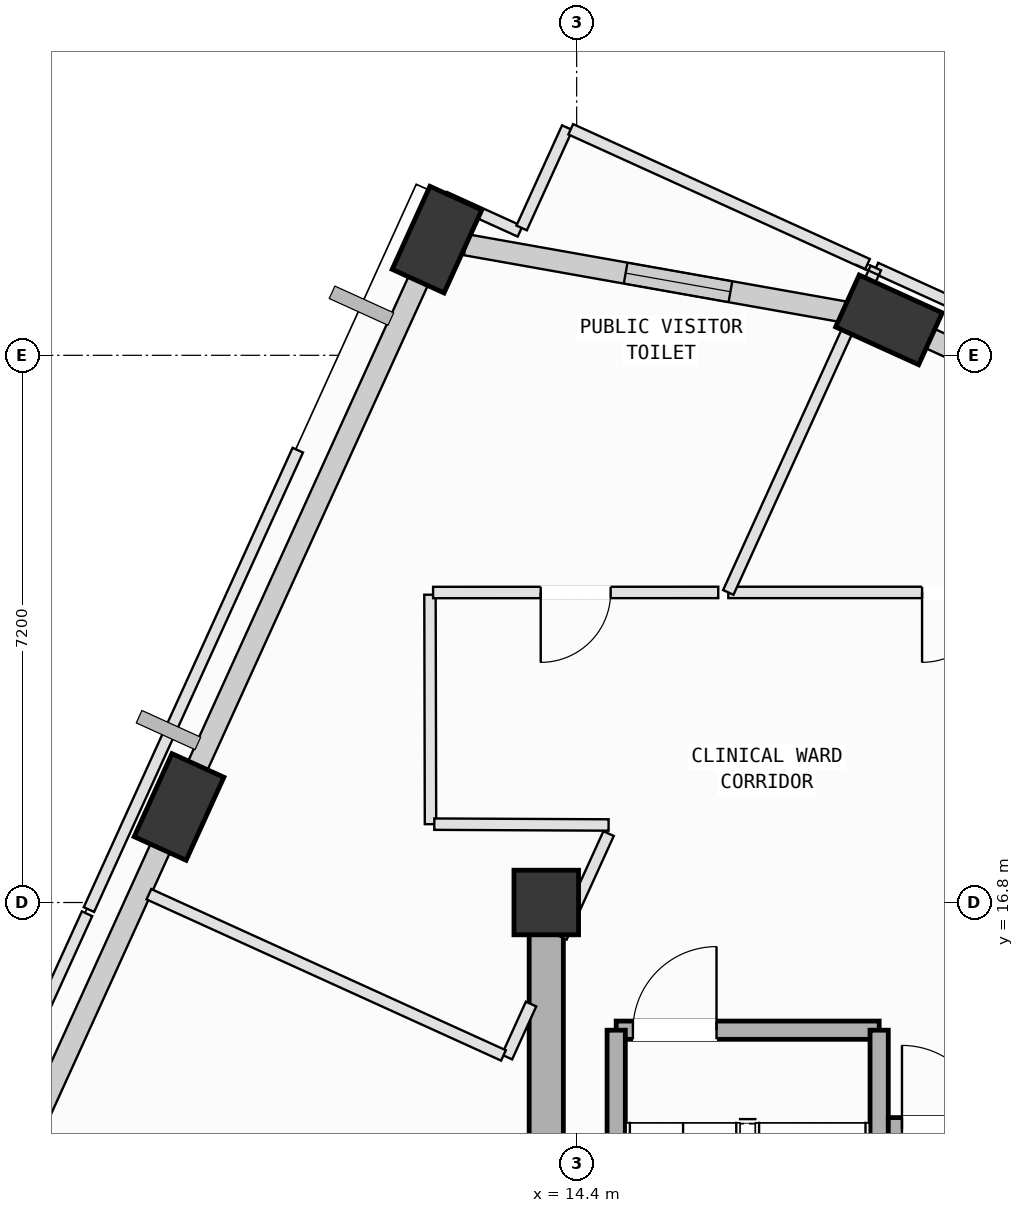
"""IFC4 building model, lengths in metres.
Left out: names, types, materials, properties, quantities, classifications, styles, units other than length and angle.
Written with IfcOpenShell. Run it as: python <this file> out.ifc"""

import sys

from ifc_helpers import new_model, si_unit, direction, frame, frame_2d, origin, origin_2d, place, context, subcontext, project, spatial, rectangle, extrude, element, fill, save


model = new_model("IFC4")
c1 = context("Model", 3, precision=1e-05, world=origin(), true_north=direction((0.0, 1.0)))
c2 = subcontext(c1, "Body", "Model", "MODEL_VIEW")
j1 = project(units=[si_unit("LENGTHUNIT", "METRE"), si_unit("PLANEANGLEUNIT", "RADIAN")], contexts=[c1])
p1 = place(None, origin())
s1 = spatial("IfcSite", under=j1, at=p1, CompositionType="ELEMENT")
p2 = place(p1, origin())
s2 = spatial("IfcBuilding", under=s1, at=p2, CompositionType="ELEMENT")
p3 = place(p2, frame((0.0, 0.0, 304.6)))
s3 = spatial("IfcBuildingStorey", under=s2, at=p3, CompositionType="ELEMENT", Elevation=304.6)
p4 = place(p3, frame((14.0, 16.8, 0.0), z_axis=(0.0, 0.0, 1.0), x_axis=(1.0, 0.0, 0.0)))
e1 = element("IfcColumn", 1, at=p4, inside=s3, PredefinedType="COLUMN", context=c2, shape_type="SweptSolid", body=[
    extrude(rectangle(XDim=0.85, YDim=0.85, at=origin_2d()), origin(), (0.0, 0.0, 1.0), 4.0),
])
p5 = place(p3, frame((18.509, 24.466, 0.002), z_axis=(0.001907962149, -0.062408826429, 0.99804884553), x_axis=(-0.92252082505, 0.385081115761, 0.025843019053)))
e2 = element("IfcColumn", 2, at=p5, inside=s3, PredefinedType="COLUMN", context=c2, shape_type="SweptSolid", body=[
    extrude(rectangle(XDim=1.2, YDim=0.75, at=origin_2d()), origin(), (0.0, 0.0, 1.0), 3.967),
])
p6 = place(p3, frame((12.562, 25.522, 0.002), z_axis=(-0.002225221518, -0.086845450907, 0.996219311219), x_axis=(0.436992381583, 0.895981854379, 0.079083342504)))
e3 = element("IfcColumn", 3, at=p6, inside=s3, PredefinedType="COLUMN", context=c2, shape_type="SweptSolid", body=[
    extrude(rectangle(XDim=1.2, YDim=0.75, at=origin_2d()), origin(), (0.0, 0.0, 1.0), 3.95),
])
p7 = place(p3, frame((9.168, 18.057, 0.002), z_axis=(0.028599058386, -0.100468120695, 0.994529160248), x_axis=(0.150218370029, 0.984069108153, 0.095091701455)))
e4 = element("IfcColumn", 4, at=p7, inside=s3, PredefinedType="COLUMN", context=c2, shape_type="SweptSolid", body=[
    extrude(rectangle(XDim=1.2, YDim=0.75, at=origin_2d()), origin(), (0.0, 0.0, 1.0), 3.944),
])
p8 = place(p3, frame((18.906, 24.286, 0.0), z_axis=(0.0, 0.0, 1.0), x_axis=(0.910319616875, -0.413906022101, 0.0)))
e5 = element("IfcWall", 5, at=p8, inside=s3, PredefinedType="SOLIDWALL", context=c2, shape_type="SweptSolid", body=[
    extrude(rectangle(XDim=6.424, YDim=0.28, at=frame_2d((3.212, 0.0))), origin(), (0.0, 0.0, 1.0), 3.265),
])
p9 = place(p8, frame((1.201, 0.0, 0.75)))
e6 = element("IfcOpeningElement", 6, at=p9, cuts=e5, PredefinedType="OPENING", context=c2, shape_type="SweptSolid", body=[
    extrude(rectangle(XDim=2.0, YDim=1.95, at=frame_2d((1.0, 0.975))), frame((0.0, 0.15, 0.0), z_axis=(0.0, -1.0, 0.0), x_axis=(1.0, 0.0, 0.0)), (0.0, 0.0, 1.0), 0.3),
])
p10 = place(p3, frame((12.941, 25.455, 0.0), z_axis=(0.0, 0.0, 1.0), x_axis=(0.984598986334, -0.174828018664, 0.0)))
e7 = element("IfcWall", 7, at=p10, inside=s3, PredefinedType="SOLIDWALL", context=c2, shape_type="SweptSolid", body=[
    extrude(rectangle(XDim=5.302, YDim=0.28, at=frame_2d((2.651, 0.0))), origin(), (0.0, 0.0, 1.0), 3.265),
])
p11 = place(p10, frame((2.137, 0.0, 0.75)))
e8 = element("IfcOpeningElement", 8, at=p11, cuts=e7, PredefinedType="OPENING", context=c2, shape_type="SweptSolid", body=[
    extrude(rectangle(XDim=1.4, YDim=1.85, at=frame_2d((0.7, 0.925))), frame((0.0, 0.15, 0.0), z_axis=(0.0, -1.0, 0.0), x_axis=(1.0, 0.0, 0.0)), (0.0, 0.0, 1.0), 0.3),
])
p12 = place(p3, frame((9.257, 18.252, 0.0), z_axis=(0.0, 0.0, 1.0), x_axis=(0.413924181298, 0.910311359996, 0.0)))
e9 = element("IfcWall", 9, at=p12, inside=s3, PredefinedType="SOLIDWALL", context=c2, shape_type="SweptSolid", body=[
    extrude(rectangle(XDim=7.434, YDim=0.28, at=frame_2d((3.717, 0.0))), origin(), (0.0, 0.0, 1.0), 3.265),
])
p13 = place(p3, frame((5.85, 10.758, 0.0), z_axis=(0.0, 0.0, 1.0), x_axis=(0.41389878739, 0.910322906334, 0.0)))
e10 = element("IfcWall", 10, at=p13, inside=s3, PredefinedType="SOLIDWALL", context=c2, shape_type="SweptSolid", body=[
    extrude(rectangle(XDim=7.485, YDim=0.28, at=frame_2d((3.742, 0.0))), origin(), (0.0, 0.0, 1.0), 3.265),
])
p14 = place(p3, frame((14.92, 15.12, 0.0), z_axis=(0.0, 0.0, 1.0), x_axis=(1.0, 0.0, 0.0)))
e11 = element("IfcWall", 11, at=p14, inside=s3, PredefinedType="SOLIDWALL", context=c2, shape_type="SweptSolid", body=[
    extrude(rectangle(XDim=3.46, YDim=0.24, at=frame_2d((1.73, 0.0))), origin(), (0.0, 0.0, 1.0), 3.78),
])
p15 = place(p14, frame((0.22, 0.0, 0.0)))
e12 = element("IfcOpeningElement", 12, at=p15, cuts=e11, PredefinedType="OPENING", context=c2, shape_type="SweptSolid", body=[
    extrude(rectangle(XDim=1.1, YDim=2.15, at=frame_2d((0.55, 1.075))), frame((0.0, 0.13, 0.0), z_axis=(0.0, -1.0, 0.0), x_axis=(1.0, 0.0, 0.0)), (0.0, 0.0, 1.0), 0.26),
])
for number, where, z_axis, x_axis in (
    (13, (18.38, 15.12, 0.0), (0.0, 0.0, 1.0), (0.0, -1.0, 0.0)),
    (14, (14.92, 8.025, 0.0), (0.0, 0.0, 1.0), (0.0, 1.0, 0.0)),
):
    element("IfcWall", number, at=place(p3, frame(where, z_axis=z_axis, x_axis=x_axis)), inside=s3, PredefinedType="SOLIDWALL", context=c2, shape_type="SweptSolid", body=[
        extrude(rectangle(XDim=7.095, YDim=0.24, at=frame_2d((3.548, 0.0))), origin(), (0.0, 0.0, 1.0), 3.78),
    ])
p16 = place(p3, frame((14.0, 16.8, 0.0), z_axis=(0.0, 0.0, 1.0), x_axis=(0.0, -1.0, 0.0)))
e15 = element("IfcWall", 15, at=p16, inside=s3, PredefinedType="SHEAR", context=c2, shape_type="SweptSolid", body=[
    extrude(rectangle(XDim=9.0, YDim=0.45, at=frame_2d((4.5, 0.0))), origin(), (0.0, 0.0, 1.0), 3.78),
])
p17 = place(p3, frame((18.5, 13.82, 0.0), z_axis=(0.0, 0.0, 1.0), x_axis=(1.0, 0.0, 0.0)))
e16 = element("IfcWall", 16, at=p17, inside=s3, PredefinedType="SOLIDWALL", context=c2, shape_type="SweptSolid", body=[
    extrude(rectangle(XDim=5.3, YDim=0.3, at=frame_2d((2.65, 0.0))), origin(), (0.0, 0.0, 1.0), 3.78),
])
p18 = place(p17, frame((0.18, 0.0, 0.0)))
e17 = element("IfcOpeningElement", 17, at=p18, cuts=e16, PredefinedType="OPENING", context=c2, shape_type="SweptSolid", body=[
    extrude(rectangle(XDim=1.1, YDim=2.15, at=frame_2d((0.55, 1.075))), frame((0.0, 0.16, 0.0), z_axis=(0.0, -1.0, 0.0), x_axis=(1.0, 0.0, 0.0)), (0.0, 0.0, 1.0), 0.32),
])
p19 = place(p3, frame((18.336, 25.149, 0.0), z_axis=(0.0, 0.0, 1.0), x_axis=(0.910329852278, -0.413883510245, 0.0)))
e18 = element("IfcWall", 18, at=p19, inside=s3, PredefinedType="PARTITIONING", context=c2, shape_type="SweptSolid", body=[
    extrude(rectangle(XDim=5.479, YDim=0.15, at=frame_2d((2.74, 0.0))), origin(), (0.0, 0.0, 1.0), 3.78),
])
p20 = place(p3, frame((22.414, 20.88, 0.0), z_axis=(0.0, 0.0, 1.0), x_axis=(-1.0, 0.0, 0.0)))
e19 = element("IfcWall", 19, at=p20, inside=s3, PredefinedType="PARTITIONING", context=c2, shape_type="SweptSolid", body=[
    extrude(rectangle(XDim=6.019, YDim=0.15, at=frame_2d((3.01, 0.0))), origin(), (0.0, 0.0, 1.0), 3.415),
])
p21 = place(p20, frame((2.55, 0.0, 0.0)))
e20 = element("IfcOpeningElement", 20, at=p21, cuts=e19, PredefinedType="OPENING", context=c2, shape_type="SweptSolid", body=[
    extrude(rectangle(XDim=0.92, YDim=2.1, at=frame_2d((0.46, 1.05))), frame((0.0, 0.085, 0.0), z_axis=(0.0, -1.0, 0.0), x_axis=(1.0, 0.0, 0.0)), (0.0, 0.0, 1.0), 0.17),
])
p22 = place(p3, frame((16.395, 20.88, 0.0), z_axis=(0.0, 0.0, 1.0), x_axis=(0.413930001639, 0.910308713428, 0.0)))
e21 = element("IfcWall", 21, at=p22, inside=s3, PredefinedType="PARTITIONING", context=c2, shape_type="SweptSolid", body=[
    extrude(rectangle(XDim=3.909, YDim=0.15, at=frame_2d((1.954, 0.0))), origin(), (0.0, 0.0, 1.0), 2.765),
])
p23 = place(p3, frame((18.111, 24.654, 0.0), z_axis=(0.0, 0.0, 1.0), x_axis=(0.413667579313, 0.91042799486, 0.0)))
e22 = element("IfcWall", 22, at=p23, inside=s3, PredefinedType="PARTITIONING", context=c2, shape_type="SweptSolid", body=[
    extrude(rectangle(XDim=0.543, YDim=0.15, at=frame_2d((0.272, 0.0))), origin(), (0.0, 0.0, 1.0), 3.78),
])
p24 = place(p3, frame((12.47, 20.85, 0.0), z_axis=(0.0, 0.0, 1.0), x_axis=(0.002345133451, -0.999997250171, 0.0)))
e23 = element("IfcWall", 23, at=p24, inside=s3, PredefinedType="PARTITIONING", context=c2, shape_type="SweptSolid", body=[
    extrude(rectangle(XDim=3.019, YDim=0.15, at=frame_2d((1.51, 0.0))), origin(), (0.0, 0.0, 1.0), 3.78),
])
p25 = place(p3, frame((12.527, 17.831, 0.0), z_axis=(0.0, 0.0, 1.0), x_axis=(0.999988521863, -0.004791256759, 0.0)))
e24 = element("IfcWall", 24, at=p25, inside=s3, PredefinedType="PARTITIONING", context=c2, shape_type="SweptSolid", body=[
    extrude(rectangle(XDim=2.293, YDim=0.15, at=frame_2d((1.146, 0.0))), origin(), (0.0, 0.0, 1.0), 3.78),
])
p26 = place(p3, frame((14.82, 17.707, 0.0), z_axis=(0.0, 0.0, 1.0), x_axis=(-0.414110008053, -0.910226840535, 0.0)))
e25 = element("IfcWall", 25, at=p26, inside=s3, PredefinedType="PARTITIONING", context=c2, shape_type="SweptSolid", body=[
    extrude(rectangle(XDim=1.498, YDim=0.15, at=frame_2d((0.749, 0.0))), origin(), (0.0, 0.0, 1.0), 2.765),
])
p27 = place(p3, frame((13.8, 15.464, 0.0), z_axis=(0.0, 0.0, 1.0), x_axis=(-0.414139199178, -0.910213559394, 0.0)))
e26 = element("IfcWall", 26, at=p27, inside=s3, PredefinedType="PARTITIONING", context=c2, shape_type="SweptSolid", body=[
    extrude(rectangle(XDim=0.766, YDim=0.15, at=frame_2d((0.383, 0.0))), origin(), (0.0, 0.0, 1.0), 3.78),
])
p28 = place(p3, frame((13.437, 14.788, 0.0), z_axis=(0.0, 0.0, 1.0), x_axis=(-0.910338738777, 0.413863963981, 0.0)))
e27 = element("IfcWall", 27, at=p28, inside=s3, PredefinedType="PARTITIONING", context=c2, shape_type="SweptSolid", body=[
    extrude(rectangle(XDim=5.125, YDim=0.15, at=frame_2d((2.562, 0.0))), origin(), (0.0, 0.0, 1.0), 3.78),
])
p29 = place(p3, frame((8.775, 17.65, 0.0), z_axis=(0.0, 0.0, 1.0), x_axis=(0.413704460003, 0.910411236625, 0.0)))
e28 = element("IfcWall", 28, at=p29, inside=s3, PredefinedType="PARTITIONING", context=c2, shape_type="SweptSolid", body=[
    extrude(rectangle(XDim=0.747, YDim=0.15, at=frame_2d((0.374, 0.0))), origin(), (0.0, 0.0, 1.0), 3.78),
])
p30 = place(p3, frame((12.161, 25.098, 0.0), z_axis=(0.0, 0.0, 1.0), x_axis=(0.413519388527, 0.910495313174, 0.0)))
e29 = element("IfcWall", 29, at=p30, inside=s3, PredefinedType="PARTITIONING", context=c2, shape_type="SweptSolid", body=[
    extrude(rectangle(XDim=1.103, YDim=0.15, at=frame_2d((0.551, 0.0))), origin(), (0.0, 0.0, 1.0), 3.265),
])
p31 = place(p3, frame((12.663, 26.081, 0.0), z_axis=(0.0, 0.0, 1.0), x_axis=(0.910266708037, -0.414022366835, 0.0)))
e30 = element("IfcWall", 30, at=p31, inside=s3, PredefinedType="PARTITIONING", context=c2, shape_type="SweptSolid", body=[
    extrude(rectangle(XDim=1.09, YDim=0.15, at=frame_2d((0.545, 0.0))), origin(), (0.0, 0.0, 1.0), 3.78),
])
p32 = place(p3, frame((13.676, 25.676, 0.0), z_axis=(0.0, 0.0, 1.0), x_axis=(0.413955262856, 0.910297226379, 0.0)))
e31 = element("IfcWall", 31, at=p32, inside=s3, PredefinedType="PARTITIONING", context=c2, shape_type="SweptSolid", body=[
    extrude(rectangle(XDim=1.449, YDim=0.15, at=frame_2d((0.725, 0.0))), origin(), (0.0, 0.0, 1.0), 3.78),
])
p33 = place(p3, frame((14.322, 26.974, 0.0), z_axis=(0.0, 0.0, 1.0), x_axis=(0.910315782424, -0.413914455256, 0.0)))
e32 = element("IfcWall", 32, at=p33, inside=s3, PredefinedType="PARTITIONING", context=c2, shape_type="SweptSolid", body=[
    extrude(rectangle(XDim=4.289, YDim=0.15, at=frame_2d((2.144, 0.0))), origin(), (0.0, 0.0, 1.0), 3.78),
])
p34 = place(p3, frame((16.263, 20.88, 0.0), z_axis=(0.0, 0.0, 1.0), x_axis=(-0.999999966127, -0.000260281095, 0.0)))
e33 = element("IfcWall", 33, at=p34, inside=s3, PredefinedType="PARTITIONING", context=c2, shape_type="SweptSolid", body=[
    extrude(rectangle(XDim=3.752, YDim=0.15, at=frame_2d((1.876, 0.0))), origin(), (0.0, 0.0, 1.0), 3.415),
])
p35 = place(p34, frame((1.416, 0.0, 0.0)))
e34 = element("IfcOpeningElement", 34, at=p35, cuts=e33, PredefinedType="OPENING", context=c2, shape_type="SweptSolid", body=[
    extrude(rectangle(XDim=0.92, YDim=2.1, at=frame_2d((0.46, 1.05))), frame((0.0, 0.085, 0.0), z_axis=(0.0, -1.0, 0.0), x_axis=(1.0, 0.0, 0.0)), (0.0, 0.0, 1.0), 0.17),
])
p36 = place(p3, frame((5.21, 10.608, 0.0), z_axis=(0.0, 0.0, 1.0), x_axis=(0.41388882426, 0.91032743623, 0.0)))
e35 = element("IfcWall", 35, at=p36, inside=s3, PredefinedType="PARTITIONING", context=c2, shape_type="SweptSolid", body=[
    extrude(rectangle(XDim=6.64, YDim=0.15, at=frame_2d((3.32, 0.0))), origin(), (0.0, 0.0, 1.0), 3.78),
])
p37 = place(p3, frame((7.983, 16.707, 0.0), z_axis=(0.0, 0.0, 1.0), x_axis=(0.41384726545, 0.910346330184, 0.0)))
e36 = element("IfcWall", 36, at=p37, inside=s3, PredefinedType="PARTITIONING", context=c2, shape_type="SweptSolid", body=[
    extrude(rectangle(XDim=6.64, YDim=0.15, at=frame_2d((3.32, 0.0))), origin(), (0.0, 0.0, 1.0), 3.78),
])
p38 = place(p11, origin())
e37 = element("IfcWindow", 37, at=p38, inside=s3, PartitioningType="SINGLE_PANEL", PredefinedType="WINDOW", context=c2, shape_type="SweptSolid", body=[
    extrude(rectangle(XDim=1.4, YDim=1.85, at=frame_2d((0.7, 0.925))), frame((0.0, 0.03, 0.0), z_axis=(0.0, -1.0, 0.0), x_axis=(1.0, 0.0, 0.0)), (0.0, 0.0, 1.0), 0.06),
])
fill(e8, e37)
p39 = place(p15, origin())
e38 = element("IfcDoor", 38, at=p39, inside=s3, OperationType="SINGLE_SWING_RIGHT", PredefinedType="DOOR", context=c2, shape_type="SweptSolid", body=[
    extrude(rectangle(XDim=1.1, YDim=2.15, at=frame_2d((0.55, 1.075))), frame((0.0, 0.025, 0.0), z_axis=(0.0, -1.0, 0.0), x_axis=(1.0, 0.0, 0.0)), (0.0, 0.0, 1.0), 0.05),
])
fill(e12, e38)
p40 = place(p18, origin())
e39 = element("IfcDoor", 39, at=p40, inside=s3, OperationType="SINGLE_SWING_LEFT", PredefinedType="DOOR", context=c2, shape_type="SweptSolid", body=[
    extrude(rectangle(XDim=1.1, YDim=2.15, at=frame_2d((0.55, 1.075))), frame((0.0, 0.025, 0.0), z_axis=(0.0, -1.0, 0.0), x_axis=(1.0, 0.0, 0.0)), (0.0, 0.0, 1.0), 0.05),
])
fill(e17, e39)
p41 = place(p21, origin())
e40 = element("IfcDoor", 40, at=p41, inside=s3, OperationType="SINGLE_SWING_RIGHT", PredefinedType="DOOR", context=c2, shape_type="SweptSolid", body=[
    extrude(rectangle(XDim=0.92, YDim=2.1, at=frame_2d((0.46, 1.05))), frame((0.0, 0.025, 0.0), z_axis=(0.0, -1.0, 0.0), x_axis=(1.0, 0.0, 0.0)), (0.0, 0.0, 1.0), 0.05),
])
fill(e20, e40)
p42 = place(p35, origin())
e41 = element("IfcDoor", 41, at=p42, inside=s3, OperationType="SINGLE_SWING_RIGHT", PredefinedType="DOOR", context=c2, shape_type="SweptSolid", body=[
    extrude(rectangle(XDim=0.92, YDim=2.1, at=frame_2d((0.46, 1.05))), frame((0.0, 0.025, 0.0), z_axis=(0.0, -1.0, 0.0), x_axis=(1.0, 0.0, 0.0)), (0.0, 0.0, 1.0), 0.05),
])
fill(e34, e41)
save(model, sys.argv[1])
